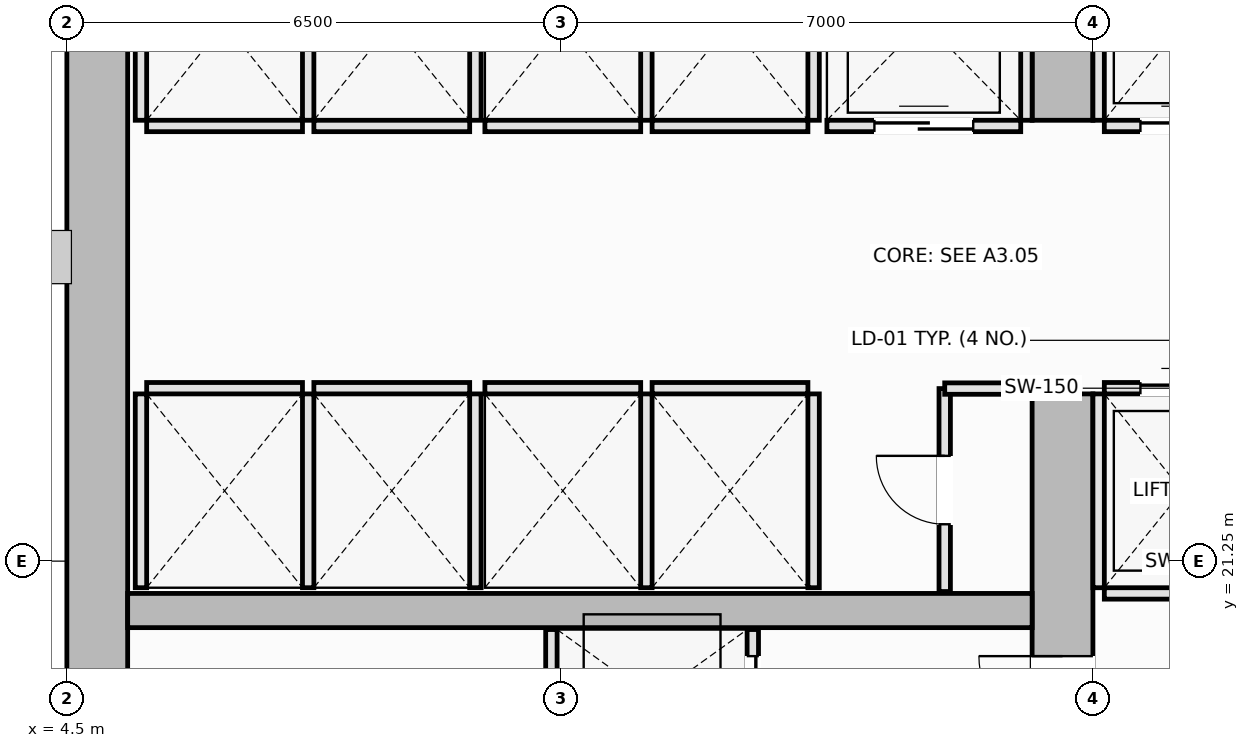
"""IFC4 building model, lengths in metres.
Left out: names, types, materials, properties, quantities, classifications, styles, units other than length and angle.
Written with IfcOpenShell. Run it as: python <this file> out.ifc"""

import sys

from ifc_helpers import new_model, si_unit, direction, frame, frame_2d, origin, place, context, subcontext, project, spatial, rectangle, extrude, element, fill, save


model = new_model("IFC4")
c1 = context("Model", 3, precision=1e-05, world=origin(), true_north=direction((0.0, 1.0)))
c2 = subcontext(c1, "Body", "Model", "MODEL_VIEW")
j1 = project(units=[si_unit("LENGTHUNIT", "METRE"), si_unit("PLANEANGLEUNIT", "RADIAN")], contexts=[c1])
p1 = place(None, origin())
s1 = spatial("IfcSite", under=j1, at=p1, CompositionType="ELEMENT")
p2 = place(p1, origin())
s2 = spatial("IfcBuilding", under=s1, at=p2, CompositionType="ELEMENT")
p3 = place(p2, frame((0.0, 0.0, 78.85)))
s3 = spatial("IfcBuildingStorey", under=s2, at=p3, CompositionType="ELEMENT", Elevation=78.85)
p4 = place(p3, frame((4.9, 14.8, 0.0), z_axis=(0.0, 0.0, 1.0), x_axis=(0.0, 1.0, 0.0)))
e1 = element("IfcWall", 1, at=p4, inside=s3, PredefinedType="SHEAR", context=c2, shape_type="SweptSolid", body=[
    extrude(rectangle(XDim=20.9, YDim=0.8, at=frame_2d((10.45, 0.0))), origin(), (0.0, 0.0, 1.0), 3.55),
])
p5 = place(p3, frame((17.6, 14.8, 0.0), z_axis=(0.0, 0.0, 1.0), x_axis=(0.0, 1.0, 0.0)))
e2 = element("IfcWall", 2, at=p5, inside=s3, PredefinedType="SHEAR", context=c2, shape_type="SweptSolid", body=[
    extrude(rectangle(XDim=8.65, YDim=0.8, at=frame_2d((4.325, 0.0))), origin(), (0.0, 0.0, 1.0), 3.55),
])
p6 = place(p5, frame((4.1, 0.0, 0.0)))
e3 = element("IfcOpeningElement", 3, at=p6, cuts=e2, PredefinedType="OPENING", context=c2, shape_type="SweptSolid", body=[
    extrude(rectangle(XDim=1.1, YDim=2.15, at=frame_2d((0.55, 1.075))), frame((0.0, 0.41, 0.0), z_axis=(0.0, -1.0, 0.0), x_axis=(1.0, 0.0, 0.0)), (0.0, 0.0, 1.0), 0.82),
])
p7 = place(p3, frame((17.6, 27.05, 0.0), z_axis=(0.0, 0.0, 1.0), x_axis=(0.0, 1.0, 0.0)))
e4 = element("IfcWall", 4, at=p7, inside=s3, PredefinedType="SHEAR", context=c2, shape_type="SweptSolid", body=[
    extrude(rectangle(XDim=8.65, YDim=0.8, at=frame_2d((4.325, 0.0))), origin(), (0.0, 0.0, 1.0), 3.55),
])
p8 = place(p7, frame((3.45, 0.0, 0.0)))
e5 = element("IfcOpeningElement", 5, at=p8, cuts=e4, PredefinedType="OPENING", context=c2, shape_type="SweptSolid", body=[
    extrude(rectangle(XDim=1.1, YDim=2.15, at=frame_2d((0.55, 1.075))), frame((0.0, 0.41, 0.0), z_axis=(0.0, -1.0, 0.0), x_axis=(1.0, 0.0, 0.0)), (0.0, 0.0, 1.0), 0.82),
])
p9 = place(p3, frame((5.3, 20.6, 0.0), z_axis=(0.0, 0.0, 1.0), x_axis=(1.0, 0.0, 0.0)))
e6 = element("IfcWall", 6, at=p9, inside=s3, PredefinedType="SHEAR", context=c2, shape_type="SweptSolid", body=[
    extrude(rectangle(XDim=11.9, YDim=0.45, at=frame_2d((5.95, 0.0))), origin(), (0.0, 0.0, 1.0), 3.55),
])
p10 = place(p3, frame((18.15, 20.825, 0.0), z_axis=(0.0, 0.0, 1.0), x_axis=(1.0, 0.0, 0.0)))
e7 = element("IfcWall", 7, at=p10, inside=s3, PredefinedType="PARTITIONING", context=c2, shape_type="SweptSolid", body=[
    extrude(rectangle(XDim=2.05, YDim=0.15, at=frame_2d((1.025, 0.0))), origin(), (0.0, 0.0, 1.0), 3.37),
])
p11 = place(p3, frame((18.15, 23.525, 0.0), z_axis=(0.0, 0.0, 1.0), x_axis=(1.0, 0.0, 0.0)))
e8 = element("IfcWall", 8, at=p11, inside=s3, PredefinedType="PARTITIONING", context=c2, shape_type="SweptSolid", body=[
    extrude(rectangle(XDim=2.05, YDim=0.15, at=frame_2d((1.025, 0.0))), origin(), (0.0, 0.0, 1.0), 3.37),
])
p12 = place(p11, frame((0.475, 0.0, 0.0)))
e9 = element("IfcOpeningElement", 9, at=p12, cuts=e8, PredefinedType="OPENING", context=c2, shape_type="SweptSolid", body=[
    extrude(rectangle(XDim=1.1, YDim=2.2, at=frame_2d((0.55, 1.1))), frame((0.0, 0.085, 0.0), z_axis=(0.0, -1.0, 0.0), x_axis=(1.0, 0.0, 0.0)), (0.0, 0.0, 1.0), 0.17),
])
p13 = place(p3, frame((18.075, 20.9, 0.0), z_axis=(0.0, 0.0, 1.0), x_axis=(0.0, 1.0, 0.0)))
e10 = element("IfcWall", 10, at=p13, inside=s3, PredefinedType="PARTITIONING", context=c2, shape_type="SweptSolid", body=[
    extrude(rectangle(XDim=2.55, YDim=0.15, at=frame_2d((1.275, 0.0))), origin(), (0.0, 0.0, 1.0), 3.37),
])
p14 = place(p3, frame((18.15, 26.975, 0.0), z_axis=(0.0, 0.0, 1.0), x_axis=(1.0, 0.0, 0.0)))
e11 = element("IfcWall", 11, at=p14, inside=s3, PredefinedType="PARTITIONING", context=c2, shape_type="SweptSolid", body=[
    extrude(rectangle(XDim=2.05, YDim=0.15, at=frame_2d((1.025, 0.0))), origin(), (0.0, 0.0, 1.0), 3.37),
])
p15 = place(p14, frame((0.475, 0.0, 0.0)))
e12 = element("IfcOpeningElement", 12, at=p15, cuts=e11, PredefinedType="OPENING", context=c2, shape_type="SweptSolid", body=[
    extrude(rectangle(XDim=1.1, YDim=2.2, at=frame_2d((0.55, 1.1))), frame((0.0, 0.085, 0.0), z_axis=(0.0, -1.0, 0.0), x_axis=(1.0, 0.0, 0.0)), (0.0, 0.0, 1.0), 0.17),
])
p16 = place(p3, frame((18.075, 27.05, 0.0), z_axis=(0.0, 0.0, 1.0), x_axis=(0.0, 1.0, 0.0)))
e13 = element("IfcWall", 13, at=p16, inside=s3, PredefinedType="PARTITIONING", context=c2, shape_type="SweptSolid", body=[
    extrude(rectangle(XDim=2.55, YDim=0.15, at=frame_2d((1.275, 0.0))), origin(), (0.0, 0.0, 1.0), 3.37),
])
p17 = place(p3, frame((5.55, 23.525, 0.0), z_axis=(0.0, 0.0, 1.0), x_axis=(1.0, 0.0, 0.0)))
e14 = element("IfcWall", 14, at=p17, inside=s3, PredefinedType="PARTITIONING", context=c2, shape_type="SweptSolid", body=[
    extrude(rectangle(XDim=2.05, YDim=0.15, at=frame_2d((1.025, 0.0))), origin(), (0.0, 0.0, 1.0), 3.37),
])
for number, where, z_axis, x_axis in (
    (15, (5.475, 20.9, 0.0), (0.0, 0.0, 1.0), (0.0, 1.0, 0.0)),
    (16, (7.675, 20.9, 0.0), (0.0, 0.0, 1.0), (0.0, 1.0, 0.0)),
):
    element("IfcWall", number, at=place(p3, frame(where, z_axis=z_axis, x_axis=x_axis)), inside=s3, PredefinedType="PARTITIONING", context=c2, shape_type="SweptSolid", body=[
        extrude(rectangle(XDim=2.55, YDim=0.15, at=frame_2d((1.275, 0.0))), origin(), (0.0, 0.0, 1.0), 3.37),
    ])
p18 = place(p3, frame((7.75, 23.525, 0.0), z_axis=(0.0, 0.0, 1.0), x_axis=(1.0, 0.0, 0.0)))
e17 = element("IfcWall", 17, at=p18, inside=s3, PredefinedType="PARTITIONING", context=c2, shape_type="SweptSolid", body=[
    extrude(rectangle(XDim=2.05, YDim=0.15, at=frame_2d((1.025, 0.0))), origin(), (0.0, 0.0, 1.0), 3.37),
])
p19 = place(p3, frame((9.875, 20.9, 0.0), z_axis=(0.0, 0.0, 1.0), x_axis=(0.0, 1.0, 0.0)))
e18 = element("IfcWall", 18, at=p19, inside=s3, PredefinedType="PARTITIONING", context=c2, shape_type="SweptSolid", body=[
    extrude(rectangle(XDim=2.55, YDim=0.15, at=frame_2d((1.275, 0.0))), origin(), (0.0, 0.0, 1.0), 3.37),
])
p20 = place(p3, frame((5.55, 26.975, 0.0), z_axis=(0.0, 0.0, 1.0), x_axis=(1.0, 0.0, 0.0)))
e19 = element("IfcWall", 19, at=p20, inside=s3, PredefinedType="PARTITIONING", context=c2, shape_type="SweptSolid", body=[
    extrude(rectangle(XDim=2.05, YDim=0.15, at=frame_2d((1.025, 0.0))), origin(), (0.0, 0.0, 1.0), 3.37),
])
for number, where, z_axis, x_axis in (
    (20, (5.475, 27.05, 0.0), (0.0, 0.0, 1.0), (0.0, 1.0, 0.0)),
    (21, (7.675, 27.05, 0.0), (0.0, 0.0, 1.0), (0.0, 1.0, 0.0)),
):
    element("IfcWall", number, at=place(p3, frame(where, z_axis=z_axis, x_axis=x_axis)), inside=s3, PredefinedType="PARTITIONING", context=c2, shape_type="SweptSolid", body=[
        extrude(rectangle(XDim=2.55, YDim=0.15, at=frame_2d((1.275, 0.0))), origin(), (0.0, 0.0, 1.0), 3.37),
    ])
p21 = place(p3, frame((7.75, 26.975, 0.0), z_axis=(0.0, 0.0, 1.0), x_axis=(1.0, 0.0, 0.0)))
e22 = element("IfcWall", 22, at=p21, inside=s3, PredefinedType="PARTITIONING", context=c2, shape_type="SweptSolid", body=[
    extrude(rectangle(XDim=2.05, YDim=0.15, at=frame_2d((1.025, 0.0))), origin(), (0.0, 0.0, 1.0), 3.37),
])
p22 = place(p3, frame((9.875, 27.05, 0.0), z_axis=(0.0, 0.0, 1.0), x_axis=(0.0, 1.0, 0.0)))
e23 = element("IfcWall", 23, at=p22, inside=s3, PredefinedType="PARTITIONING", context=c2, shape_type="SweptSolid", body=[
    extrude(rectangle(XDim=2.55, YDim=0.15, at=frame_2d((1.275, 0.0))), origin(), (0.0, 0.0, 1.0), 3.37),
])
p23 = place(p3, frame((10.0, 23.525, 0.0), z_axis=(0.0, 0.0, 1.0), x_axis=(1.0, 0.0, 0.0)))
e24 = element("IfcWall", 24, at=p23, inside=s3, PredefinedType="PARTITIONING", context=c2, shape_type="SweptSolid", body=[
    extrude(rectangle(XDim=2.05, YDim=0.15, at=frame_2d((1.025, 0.0))), origin(), (0.0, 0.0, 1.0), 3.37),
])
p24 = place(p3, frame((12.125, 20.9, 0.0), z_axis=(0.0, 0.0, 1.0), x_axis=(0.0, 1.0, 0.0)))
e25 = element("IfcWall", 25, at=p24, inside=s3, PredefinedType="PARTITIONING", context=c2, shape_type="SweptSolid", body=[
    extrude(rectangle(XDim=2.55, YDim=0.15, at=frame_2d((1.275, 0.0))), origin(), (0.0, 0.0, 1.0), 3.37),
])
p25 = place(p3, frame((12.2, 23.525, 0.0), z_axis=(0.0, 0.0, 1.0), x_axis=(1.0, 0.0, 0.0)))
e26 = element("IfcWall", 26, at=p25, inside=s3, PredefinedType="PARTITIONING", context=c2, shape_type="SweptSolid", body=[
    extrude(rectangle(XDim=2.05, YDim=0.15, at=frame_2d((1.025, 0.0))), origin(), (0.0, 0.0, 1.0), 3.37),
])
p26 = place(p3, frame((14.325, 20.9, 0.0), z_axis=(0.0, 0.0, 1.0), x_axis=(0.0, 1.0, 0.0)))
e27 = element("IfcWall", 27, at=p26, inside=s3, PredefinedType="PARTITIONING", context=c2, shape_type="SweptSolid", body=[
    extrude(rectangle(XDim=2.55, YDim=0.15, at=frame_2d((1.275, 0.0))), origin(), (0.0, 0.0, 1.0), 3.37),
])
p27 = place(p3, frame((10.0, 26.975, 0.0), z_axis=(0.0, 0.0, 1.0), x_axis=(1.0, 0.0, 0.0)))
e28 = element("IfcWall", 28, at=p27, inside=s3, PredefinedType="PARTITIONING", context=c2, shape_type="SweptSolid", body=[
    extrude(rectangle(XDim=2.05, YDim=0.15, at=frame_2d((1.025, 0.0))), origin(), (0.0, 0.0, 1.0), 3.37),
])
p28 = place(p3, frame((12.125, 27.05, 0.0), z_axis=(0.0, 0.0, 1.0), x_axis=(0.0, 1.0, 0.0)))
e29 = element("IfcWall", 29, at=p28, inside=s3, PredefinedType="PARTITIONING", context=c2, shape_type="SweptSolid", body=[
    extrude(rectangle(XDim=2.55, YDim=0.15, at=frame_2d((1.275, 0.0))), origin(), (0.0, 0.0, 1.0), 3.37),
])
p29 = place(p3, frame((12.2, 26.975, 0.0), z_axis=(0.0, 0.0, 1.0), x_axis=(1.0, 0.0, 0.0)))
e30 = element("IfcWall", 30, at=p29, inside=s3, PredefinedType="PARTITIONING", context=c2, shape_type="SweptSolid", body=[
    extrude(rectangle(XDim=2.05, YDim=0.15, at=frame_2d((1.025, 0.0))), origin(), (0.0, 0.0, 1.0), 3.37),
])
p30 = place(p3, frame((14.325, 27.05, 0.0), z_axis=(0.0, 0.0, 1.0), x_axis=(0.0, 1.0, 0.0)))
e31 = element("IfcWall", 31, at=p30, inside=s3, PredefinedType="PARTITIONING", context=c2, shape_type="SweptSolid", body=[
    extrude(rectangle(XDim=2.55, YDim=0.15, at=frame_2d((1.275, 0.0))), origin(), (0.0, 0.0, 1.0), 3.37),
])
p31 = place(p3, frame((14.5, 26.975, 0.0), z_axis=(0.0, 0.0, 1.0), x_axis=(1.0, 0.0, 0.0)))
e32 = element("IfcWall", 32, at=p31, inside=s3, PredefinedType="PARTITIONING", context=c2, shape_type="SweptSolid", body=[
    extrude(rectangle(XDim=2.55, YDim=0.15, at=frame_2d((1.275, 0.0))), origin(), (0.0, 0.0, 1.0), 3.37),
])
p32 = place(p31, frame((0.625, 0.0, 0.0)))
e33 = element("IfcOpeningElement", 33, at=p32, cuts=e32, PredefinedType="OPENING", context=c2, shape_type="SweptSolid", body=[
    extrude(rectangle(XDim=1.3, YDim=2.2, at=frame_2d((0.65, 1.1))), frame((0.0, 0.085, 0.0), z_axis=(0.0, -1.0, 0.0), x_axis=(1.0, 0.0, 0.0)), (0.0, 0.0, 1.0), 0.17),
])
p33 = place(p3, frame((17.125, 27.05, 0.0), z_axis=(0.0, 0.0, 1.0), x_axis=(0.0, 1.0, 0.0)))
e34 = element("IfcWall", 34, at=p33, inside=s3, PredefinedType="PARTITIONING", context=c2, shape_type="SweptSolid", body=[
    extrude(rectangle(XDim=2.6, YDim=0.15, at=frame_2d((1.3, 0.0))), origin(), (0.0, 0.0, 1.0), 3.37),
])
p34 = place(p3, frame((10.875, 18.55, 0.0), z_axis=(0.0, 0.0, 1.0), x_axis=(0.0, 1.0, 0.0)))
e35 = element("IfcWall", 35, at=p34, inside=s3, PredefinedType="PARTITIONING", context=c2, shape_type="SweptSolid", body=[
    extrude(rectangle(XDim=1.8, YDim=0.15, at=frame_2d((0.9, 0.0))), origin(), (0.0, 0.0, 1.0), 3.37),
])
p35 = place(p3, frame((13.525, 18.55, 0.0), z_axis=(0.0, 0.0, 1.0), x_axis=(0.0, 1.0, 0.0)))
e36 = element("IfcWall", 36, at=p35, inside=s3, PredefinedType="PARTITIONING", context=c2, shape_type="SweptSolid", body=[
    extrude(rectangle(XDim=1.8, YDim=0.15, at=frame_2d((0.9, 0.0))), origin(), (0.0, 0.0, 1.0), 3.37),
])
p36 = place(p35, frame((0.35, 0.0, 0.0)))
e37 = element("IfcOpeningElement", 37, at=p36, cuts=e36, PredefinedType="OPENING", context=c2, shape_type="SweptSolid", body=[
    extrude(rectangle(XDim=1.1, YDim=2.2, at=frame_2d((0.55, 1.1))), frame((0.0, 0.085, 0.0), z_axis=(0.0, -1.0, 0.0), x_axis=(1.0, 0.0, 0.0)), (0.0, 0.0, 1.0), 0.17),
])
p37 = place(p3, frame((16.05, 20.85, 0.0), z_axis=(0.0, 0.0, 1.0), x_axis=(0.0, 1.0, 0.0)))
e38 = element("IfcWall", 38, at=p37, inside=s3, PredefinedType="PARTITIONING", context=c2, shape_type="SweptSolid", body=[
    extrude(rectangle(XDim=2.67, YDim=0.15, at=frame_2d((1.335, 0.0))), origin(), (0.0, 0.0, 1.0), 3.37),
])
p38 = place(p37, frame((0.885, 0.0, 0.0)))
e39 = element("IfcOpeningElement", 39, at=p38, cuts=e38, PredefinedType="OPENING", context=c2, shape_type="SweptSolid", body=[
    extrude(rectangle(XDim=0.9, YDim=2.1, at=frame_2d((0.45, 1.05))), frame((0.0, 0.085, 0.0), z_axis=(0.0, -1.0, 0.0), x_axis=(1.0, 0.0, 0.0)), (0.0, 0.0, 1.0), 0.17),
])
p39 = place(p3, frame((16.05, 23.52, 0.0), z_axis=(0.0, 0.0, 1.0), x_axis=(1.0, 0.0, 0.0)))
e40 = element("IfcWall", 40, at=p39, inside=s3, PredefinedType="PARTITIONING", context=c2, shape_type="SweptSolid", body=[
    extrude(rectangle(XDim=1.17, YDim=0.15, at=frame_2d((0.585, 0.0))), origin(), (0.0, 0.0, 1.0), 3.37),
])
p40 = place(p12, origin())
e41 = element("IfcDoor", 41, at=p40, inside=s3, OperationType="DOUBLE_DOOR_SLIDING", PredefinedType="DOOR", context=c2, shape_type="SweptSolid", body=[
    extrude(rectangle(XDim=1.1, YDim=2.2, at=frame_2d((0.55, 1.1))), frame((0.0, 0.025, 0.0), z_axis=(0.0, -1.0, 0.0), x_axis=(1.0, 0.0, 0.0)), (0.0, 0.0, 1.0), 0.05),
])
fill(e9, e41)
p41 = place(p15, origin())
e42 = element("IfcDoor", 42, at=p41, inside=s3, OperationType="DOUBLE_DOOR_SLIDING", PredefinedType="DOOR", context=c2, shape_type="SweptSolid", body=[
    extrude(rectangle(XDim=1.1, YDim=2.2, at=frame_2d((0.55, 1.1))), frame((0.0, 0.025, 0.0), z_axis=(0.0, -1.0, 0.0), x_axis=(1.0, 0.0, 0.0)), (0.0, 0.0, 1.0), 0.05),
])
fill(e12, e42)
p42 = place(p32, origin())
e43 = element("IfcDoor", 43, at=p42, inside=s3, OperationType="DOUBLE_DOOR_SLIDING", PredefinedType="DOOR", context=c2, shape_type="SweptSolid", body=[
    extrude(rectangle(XDim=1.3, YDim=2.2, at=frame_2d((0.65, 1.1))), frame((0.0, 0.025, 0.0), z_axis=(0.0, -1.0, 0.0), x_axis=(1.0, 0.0, 0.0)), (0.0, 0.0, 1.0), 0.05),
])
fill(e33, e43)
p43 = place(p36, origin())
e44 = element("IfcDoor", 44, at=p43, inside=s3, OperationType="DOUBLE_DOOR_SLIDING", PredefinedType="DOOR", context=c2, shape_type="SweptSolid", body=[
    extrude(rectangle(XDim=1.1, YDim=2.2, at=frame_2d((0.55, 1.1))), frame((0.0, 0.025, 0.0), z_axis=(0.0, -1.0, 0.0), x_axis=(1.0, 0.0, 0.0)), (0.0, 0.0, 1.0), 0.05),
])
fill(e37, e44)
p44 = place(p6, origin())
e45 = element("IfcDoor", 45, at=p44, inside=s3, OperationType="SINGLE_SWING_RIGHT", PredefinedType="DOOR", context=c2, shape_type="SweptSolid", body=[
    extrude(rectangle(XDim=1.1, YDim=2.15, at=frame_2d((0.55, 1.075))), frame((0.0, 0.025, 0.0), z_axis=(0.0, -1.0, 0.0), x_axis=(1.0, 0.0, 0.0)), (0.0, 0.0, 1.0), 0.05),
])
fill(e3, e45)
p45 = place(p38, origin())
e46 = element("IfcDoor", 46, at=p45, inside=s3, OperationType="SINGLE_SWING_RIGHT", PredefinedType="DOOR", context=c2, shape_type="SweptSolid", body=[
    extrude(rectangle(XDim=0.9, YDim=2.1, at=frame_2d((0.45, 1.05))), frame((0.0, 0.025, 0.0), z_axis=(0.0, -1.0, 0.0), x_axis=(1.0, 0.0, 0.0)), (0.0, 0.0, 1.0), 0.05),
])
fill(e39, e46)
save(model, sys.argv[1])
